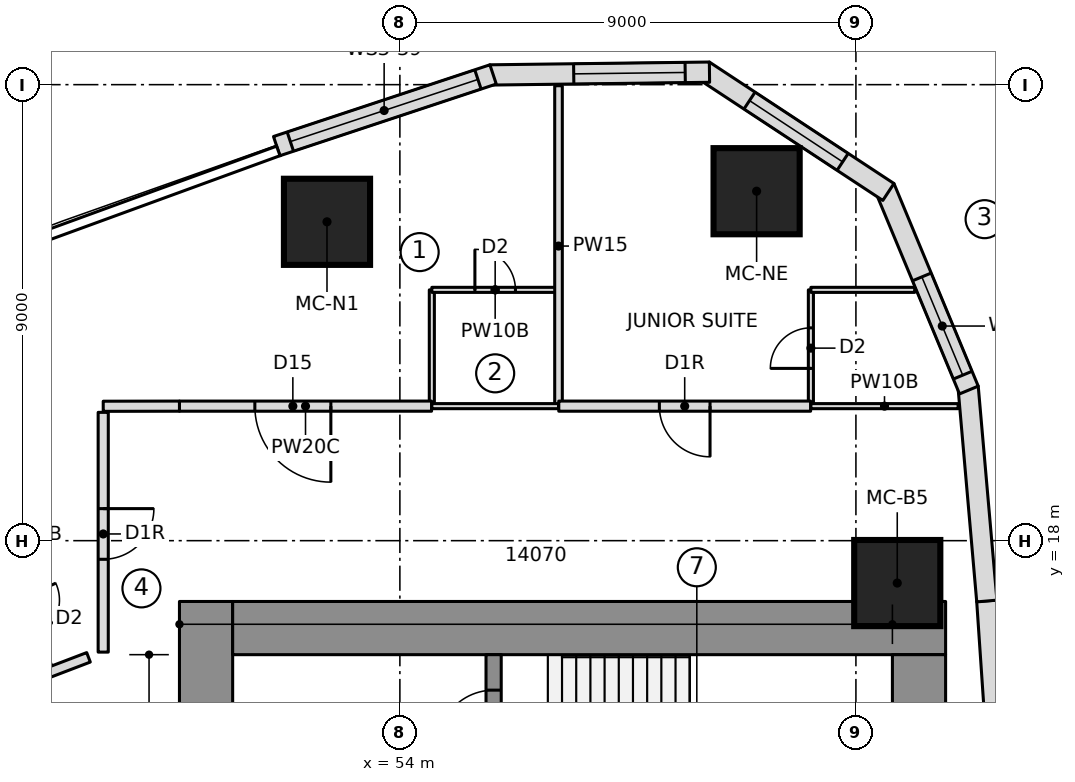
"""IFC4 building model, lengths in metres.
Left out: names, types, materials, properties, quantities, classifications, styles, units other than length and angle.
Written with IfcOpenShell. Run it as: python <this file> out.ifc"""

import sys

from ifc_helpers import new_model, si_unit, direction, frame, frame_2d, origin, origin_2d, place, context, subcontext, project, spatial, polyline, rectangle, outline, extrude, element, fill, save


model = new_model("IFC4")
c1 = context("Model", 3, precision=1e-05, world=origin(), true_north=direction((0.0, 1.0)))
c2 = subcontext(c1, "Body", "Model", "MODEL_VIEW")
j1 = project(units=[si_unit("LENGTHUNIT", "METRE"), si_unit("PLANEANGLEUNIT", "RADIAN")], contexts=[c1])
p1 = place(None, origin())
s1 = spatial("IfcSite", under=j1, at=p1, CompositionType="ELEMENT")
p2 = place(p1, origin())
s2 = spatial("IfcBuilding", under=s1, at=p2, CompositionType="ELEMENT")
p3 = place(p2, frame((0.0, 0.0, 109.75)))
s3 = spatial("IfcBuildingStorey", under=s2, at=p3, CompositionType="ELEMENT", Elevation=109.75)
p4 = place(p3, frame((50.175, 6.65, 0.0), z_axis=(0.0, 0.0, 1.0), x_axis=(0.0, 1.0, 0.0)))
e1 = element("IfcWall", 1, at=p4, inside=s3, PredefinedType="SHEAR", context=c2, shape_type="SweptSolid", body=[
    extrude(rectangle(XDim=10.15, YDim=1.05, at=frame_2d((5.075, 0.0))), origin(), (0.0, 0.0, 1.0), 3.55),
])
p5 = place(p4, frame((6.5, 0.0, 0.0)))
e2 = element("IfcOpeningElement", 2, at=p5, cuts=e1, PredefinedType="OPENING", context=c2, shape_type="SweptSolid", body=[
    extrude(rectangle(XDim=1.1, YDim=2.1, at=frame_2d((0.55, 1.05))), frame((0.0, 0.535, 0.0), z_axis=(0.0, -1.0, 0.0), x_axis=(1.0, 0.0, 0.0)), (0.0, 0.0, 1.0), 1.07),
])
p6 = place(p3, frame((50.7, 16.275, 0.0), z_axis=(0.0, 0.0, 1.0), x_axis=(1.0, 0.0, 0.0)))
e3 = element("IfcWall", 3, at=p6, inside=s3, PredefinedType="SHEAR", context=c2, shape_type="SweptSolid", body=[
    extrude(rectangle(XDim=14.07, YDim=1.05, at=frame_2d((7.035, 0.0))), origin(), (0.0, 0.0, 1.0), 3.55),
])
p7 = place(p3, frame((64.245, 9.389, 0.0), z_axis=(0.0, 0.0, 1.0), x_axis=(0.0, 1.0, 0.0)))
e4 = element("IfcWall", 4, at=p7, inside=s3, PredefinedType="SHEAR", context=c2, shape_type="SweptSolid", body=[
    extrude(rectangle(XDim=6.361, YDim=1.05, at=frame_2d((3.181, 0.0))), origin(), (0.0, 0.0, 1.0), 3.55),
])
p8 = place(p3, frame((55.85, 10.35, 0.0), z_axis=(0.0, 0.0, 1.0), x_axis=(0.0, 1.0, 0.0)))
e5 = element("IfcWall", 5, at=p8, inside=s3, PredefinedType="SHEAR", context=c2, shape_type="SweptSolid", body=[
    extrude(rectangle(XDim=5.4, YDim=0.3, at=frame_2d((2.7, 0.0))), origin(), (0.0, 0.0, 1.0), 3.55),
])
p9 = place(p8, frame((1.43, 0.0, 0.0)))
e6 = element("IfcOpeningElement", 6, at=p9, cuts=e5, PredefinedType="OPENING", context=c2, shape_type="SweptSolid", body=[
    extrude(rectangle(XDim=1.1, YDim=2.1, at=frame_2d((0.55, 1.05))), frame((0.0, 0.16, 0.0), z_axis=(0.0, -1.0, 0.0), x_axis=(1.0, 0.0, 0.0)), (0.0, 0.0, 1.0), 0.32),
])
p10 = place(p8, frame((3.6, 0.0, 0.0)))
e7 = element("IfcOpeningElement", 7, at=p10, cuts=e5, PredefinedType="OPENING", context=c2, shape_type="SweptSolid", body=[
    extrude(rectangle(XDim=1.1, YDim=2.1, at=frame_2d((0.55, 1.05))), frame((0.0, 0.16, 0.0), z_axis=(0.0, -1.0, 0.0), x_axis=(1.0, 0.0, 0.0)), (0.0, 0.0, 1.0), 0.32),
])
for number, where, z_axis, x_axis in (
    (8, (63.816, 17.164, 0.0), (0.0, 0.0, 1.0), (1.0, 0.0, 0.0)),
    (9, (61.04, 24.897, 0.0), (0.0, 0.0, 1.0), (1.0, 0.0, 0.0)),
    (10, (52.562, 24.293, 0.0), (0.0, 0.0, 1.0), (1.0, 0.0, 0.0)),
):
    element("IfcColumn", number, at=place(p3, frame(where, z_axis=z_axis, x_axis=x_axis)), inside=s3, PredefinedType="COLUMN", context=c2, shape_type="SweptSolid", body=[
        extrude(rectangle(XDim=1.7, YDim=1.7, at=origin_2d()), origin(), (0.0, 0.0, 1.0), 3.55),
    ])
p11 = place(p3, frame((65.868, 12.614, 0.0), z_axis=(0.0, 0.0, 1.0), x_axis=(-0.067724559895, 0.997704056315, 0.0)))
e11 = element("IfcWall", 11, at=p11, inside=s3, PredefinedType="NOTDEFINED", context=c2, shape_type="SweptSolid", body=[
    extrude(outline(polyline([(-0.002, -0.2), (4.209, -0.2), (4.205, 0.2), (0.002, 0.2), (-0.002, -0.2)])), origin(), (0.0, 0.0, 1.0), 3.25),
])
p12 = place(p3, frame((65.583, 16.811, 0.0), z_axis=(0.0, 0.0, 1.0), x_axis=(-0.086992730434, 0.996208946382, 0.0)))
e12 = element("IfcWall", 12, at=p12, inside=s3, PredefinedType="NOTDEFINED", context=c2, shape_type="SweptSolid", body=[
    extrude(outline(polyline([(-0.002, -0.2), (4.238, -0.2), (4.176, 0.2), (0.002, 0.2), (-0.002, -0.2)])), origin(), (0.0, 0.0, 1.0), 3.25),
])
p13 = place(p3, frame((65.217, 21.002, 0.0), z_axis=(0.0, 0.0, 1.0), x_axis=(-0.383997751971, 0.923334027577, 0.0)))
e13 = element("IfcWall", 13, at=p13, inside=s3, PredefinedType="NOTDEFINED", context=c2, shape_type="SweptSolid", body=[
    extrude(outline(polyline([(-0.031, -0.2), (4.3, -0.2), (4.177, 0.2), (0.031, 0.2), (-0.031, -0.2)])), origin(), (0.0, 0.0, 1.0), 3.25),
])
p14 = place(p13, frame((0.287, 0.0, 0.6)))
e14 = element("IfcOpeningElement", 14, at=p14, cuts=e13, PredefinedType="OPENING", context=c2, shape_type="SweptSolid", body=[
    extrude(outline(polyline([(0.0, 1.4), (0.08, 1.802), (0.308, 2.142), (0.648, 2.37), (1.05, 2.45), (1.452, 2.37), (1.792, 2.142), (2.02, 1.802), (2.1, 1.4), (2.1, 1.05), (2.02, 0.648), (1.792, 0.308), (1.452, 0.08), (1.05, 0.0), (0.648, 0.08), (0.308, 0.308), (0.08, 0.648), (0.0, 1.05), (0.0, 1.4)])), frame((0.0, 0.21, 0.0), z_axis=(0.0, -1.0, 0.0), x_axis=(1.0, 0.0, 0.0)), (0.0, 0.0, 1.0), 0.42),
])
p15 = place(p3, frame((63.59, 24.916, 0.0), z_axis=(0.0, 0.0, 1.0), x_axis=(-0.835340523653, 0.549732852887, 0.0)))
e15 = element("IfcWall", 15, at=p15, inside=s3, PredefinedType="NOTDEFINED", context=c2, shape_type="SweptSolid", body=[
    extrude(outline(polyline([(-0.061, -0.2), (4.3, -0.2), (4.178, 0.2), (0.061, 0.2), (-0.061, -0.2)])), origin(), (0.0, 0.0, 1.0), 3.25),
])
p16 = place(p15, frame((1.02, 0.0, 0.6)))
e16 = element("IfcOpeningElement", 16, at=p16, cuts=e15, PredefinedType="OPENING", context=c2, shape_type="SweptSolid", body=[
    extrude(outline(polyline([(0.0, 1.35), (0.084, 1.771), (0.322, 2.128), (0.679, 2.366), (1.1, 2.45), (1.521, 2.366), (1.878, 2.128), (2.116, 1.771), (2.2, 1.35), (2.2, 1.1), (2.116, 0.679), (1.878, 0.322), (1.521, 0.084), (1.1, 0.0), (0.679, 0.084), (0.322, 0.322), (0.084, 0.679), (0.0, 1.1), (0.0, 1.35)])), frame((0.0, 0.21, 0.0), z_axis=(0.0, -1.0, 0.0), x_axis=(1.0, 0.0, 0.0)), (0.0, 0.0, 1.0), 0.42),
])
p17 = place(p3, frame((60.049, 27.246, 0.0), z_axis=(0.0, 0.0, 1.0), x_axis=(-0.999919718849, -0.012671063772, 0.0)))
e17 = element("IfcWall", 17, at=p17, inside=s3, PredefinedType="NOTDEFINED", context=c2, shape_type="SweptSolid", body=[
    extrude(outline(polyline([(-0.061, -0.2), (4.27, -0.2), (4.208, 0.2), (0.061, 0.2), (-0.061, -0.2)])), origin(), (0.0, 0.0, 1.0), 3.25),
])
p18 = place(p17, frame((0.418, 0.0, 0.6)))
e18 = element("IfcOpeningElement", 18, at=p18, cuts=e17, PredefinedType="OPENING", context=c2, shape_type="SweptSolid", body=[
    extrude(outline(polyline([(0.0, 1.35), (0.084, 1.771), (0.322, 2.128), (0.679, 2.366), (1.1, 2.45), (1.521, 2.366), (1.878, 2.128), (2.116, 1.771), (2.2, 1.35), (2.2, 1.1), (2.116, 0.679), (1.878, 0.322), (1.521, 0.084), (1.1, 0.0), (0.679, 0.084), (0.322, 0.322), (0.084, 0.679), (0.0, 1.1), (0.0, 1.35)])), frame((0.0, 0.21, 0.0), z_axis=(0.0, -1.0, 0.0), x_axis=(1.0, 0.0, 0.0)), (0.0, 0.0, 1.0), 0.42),
])
p19 = place(p3, frame((55.81, 27.192, 0.0), z_axis=(0.0, 0.0, 1.0), x_axis=(-0.94925004851, -0.314522408429, 0.0)))
e19 = element("IfcWall", 19, at=p19, inside=s3, PredefinedType="NOTDEFINED", context=c2, shape_type="SweptSolid", body=[
    extrude(outline(polyline([(-0.031, -0.2), (4.468, -0.2), (4.468, 0.2), (0.031, 0.2), (-0.031, -0.2)])), origin(), (0.0, 0.0, 1.0), 3.25),
])
p20 = place(p19, frame((0.284, 0.0, 0.9)))
e20 = element("IfcOpeningElement", 20, at=p20, cuts=e19, PredefinedType="OPENING", context=c2, shape_type="SweptSolid", body=[
    extrude(rectangle(XDim=3.9, YDim=1.8, at=frame_2d((1.95, 0.9))), frame((0.0, 0.21, 0.0), z_axis=(0.0, -1.0, 0.0), x_axis=(1.0, 0.0, 0.0)), (0.0, 0.0, 1.0), 0.42),
])
p21 = place(p3, frame((54.631, 20.65, 0.0), z_axis=(0.0, 0.0, 1.0), x_axis=(0.0, 1.0, 0.0)))
e21 = element("IfcWall", 21, at=p21, inside=s3, PredefinedType="PARTITIONING", context=c2, shape_type="SweptSolid", body=[
    extrude(rectangle(XDim=2.3, YDim=0.1, at=frame_2d((1.15, 0.0))), origin(), (0.0, 0.0, 1.0), 3.25),
])
p22 = place(p3, frame((54.631, 22.95, 0.0), z_axis=(0.0, 0.0, 1.0), x_axis=(1.0, 0.0, 0.0)))
e22 = element("IfcWall", 22, at=p22, inside=s3, PredefinedType="PARTITIONING", context=c2, shape_type="SweptSolid", body=[
    extrude(rectangle(XDim=2.5, YDim=0.1, at=frame_2d((1.25, 0.0))), origin(), (0.0, 0.0, 1.0), 3.25),
])
p23 = place(p22, frame((0.85, 0.0, 0.0)))
e23 = element("IfcOpeningElement", 23, at=p23, cuts=e22, PredefinedType="OPENING", context=c2, shape_type="SweptSolid", body=[
    extrude(rectangle(XDim=0.8, YDim=2.1, at=frame_2d((0.4, 1.05))), frame((0.0, 0.06, 0.0), z_axis=(0.0, -1.0, 0.0), x_axis=(1.0, 0.0, 0.0)), (0.0, 0.0, 1.0), 0.12),
])
p24 = place(p3, frame((62.111, 20.65, 0.0), z_axis=(0.0, 0.0, 1.0), x_axis=(0.0, 1.0, 0.0)))
e24 = element("IfcWall", 24, at=p24, inside=s3, PredefinedType="PARTITIONING", context=c2, shape_type="SweptSolid", body=[
    extrude(rectangle(XDim=2.3, YDim=0.1, at=frame_2d((1.15, 0.0))), origin(), (0.0, 0.0, 1.0), 3.25),
])
p25 = place(p24, frame((0.75, 0.0, 0.0)))
e25 = element("IfcOpeningElement", 25, at=p25, cuts=e24, PredefinedType="OPENING", context=c2, shape_type="SweptSolid", body=[
    extrude(rectangle(XDim=0.8, YDim=2.1, at=frame_2d((0.4, 1.05))), frame((0.0, 0.06, 0.0), z_axis=(0.0, -1.0, 0.0), x_axis=(1.0, 0.0, 0.0)), (0.0, 0.0, 1.0), 0.12),
])
p26 = place(p3, frame((62.111, 22.95, 0.0), z_axis=(0.0, 0.0, 1.0), x_axis=(1.0, 0.0, 0.0)))
e26 = element("IfcWall", 26, at=p26, inside=s3, PredefinedType="PARTITIONING", context=c2, shape_type="SweptSolid", body=[
    extrude(rectangle(XDim=2.049, YDim=0.1, at=frame_2d((1.025, 0.0))), origin(), (0.0, 0.0, 1.0), 3.25),
])
p27 = place(p3, frame((57.131, 20.65, 0.0), z_axis=(0.0, 0.0, 1.0), x_axis=(0.0, 1.0, 0.0)))
e27 = element("IfcWall", 27, at=p27, inside=s3, PredefinedType="PARTITIONING", context=c2, shape_type="SweptSolid", body=[
    extrude(rectangle(XDim=6.329, YDim=0.15, at=frame_2d((3.165, 0.0))), origin(), (0.0, 0.0, 1.0), 3.25),
])
p28 = place(p3, frame((46.169, 17.509, 0.0), z_axis=(0.0, 0.0, 1.0), x_axis=(0.417409478396, -0.90871850831, 0.0)))
e28 = element("IfcWall", 28, at=p28, inside=s3, PredefinedType="PARTITIONING", context=c2, shape_type="SweptSolid", body=[
    extrude(rectangle(XDim=2.283, YDim=0.1, at=frame_2d((1.142, 0.0))), origin(), (0.0, 0.0, 1.0), 3.25),
])
p29 = place(p28, frame((0.75, 0.0, 0.0)))
e29 = element("IfcOpeningElement", 29, at=p29, cuts=e28, PredefinedType="OPENING", context=c2, shape_type="SweptSolid", body=[
    extrude(rectangle(XDim=0.8, YDim=2.1, at=frame_2d((0.4, 1.05))), frame((0.0, 0.06, 0.0), z_axis=(0.0, -1.0, 0.0), x_axis=(1.0, 0.0, 0.0)), (0.0, 0.0, 1.0), 0.12),
])
p30 = place(p3, frame((54.625, 20.655, 0.0), z_axis=(0.0, 0.0, 1.0), x_axis=(-1.0, 0.0, 0.0)))
e30 = element("IfcWall", 30, at=p30, inside=s3, PredefinedType="PARTITIONING", context=c2, shape_type="SweptSolid", body=[
    extrude(rectangle(XDim=4.976, YDim=0.2, at=frame_2d((2.488, 0.0))), origin(), (0.0, 0.0, 1.0), 3.25),
])
p31 = place(p30, frame((1.988, 0.0, 0.0)))
e31 = element("IfcOpeningElement", 31, at=p31, cuts=e30, PredefinedType="OPENING", context=c2, shape_type="SweptSolid", body=[
    extrude(rectangle(XDim=1.5, YDim=2.1, at=frame_2d((0.75, 1.05))), frame((0.0, 0.11, 0.0), z_axis=(0.0, -1.0, 0.0), x_axis=(1.0, 0.0, 0.0)), (0.0, 0.0, 1.0), 0.22),
])
p32 = place(p3, frame((62.106, 20.655, 0.0), z_axis=(0.0, 0.0, 1.0), x_axis=(-1.0, 0.0, 0.0)))
e32 = element("IfcWall", 32, at=p32, inside=s3, PredefinedType="PARTITIONING", context=c2, shape_type="SweptSolid", body=[
    extrude(rectangle(XDim=4.971, YDim=0.2, at=frame_2d((2.485, 0.0))), origin(), (0.0, 0.0, 1.0), 3.25),
])
p33 = place(p32, frame((1.985, 0.0, 0.0)))
e33 = element("IfcOpeningElement", 33, at=p33, cuts=e32, PredefinedType="OPENING", context=c2, shape_type="SweptSolid", body=[
    extrude(rectangle(XDim=1.0, YDim=2.1, at=frame_2d((0.5, 1.05))), frame((0.0, 0.11, 0.0), z_axis=(0.0, -1.0, 0.0), x_axis=(1.0, 0.0, 0.0)), (0.0, 0.0, 1.0), 0.22),
])
p34 = place(p3, frame((57.131, 20.655, 0.0), z_axis=(0.0, 0.0, 1.0), x_axis=(-1.0, 0.0, 0.0)))
e34 = element("IfcWall", 34, at=p34, inside=s3, PredefinedType="PARTITIONING", context=c2, shape_type="SweptSolid", body=[
    extrude(rectangle(XDim=2.5, YDim=0.1, at=frame_2d((1.25, 0.0))), origin(), (0.0, 0.0, 1.0), 3.25),
])
p35 = place(p3, frame((65.017, 20.655, 0.0), z_axis=(0.0, 0.0, 1.0), x_axis=(-1.0, 0.0, 0.0)))
e35 = element("IfcWall", 35, at=p35, inside=s3, PredefinedType="PARTITIONING", context=c2, shape_type="SweptSolid", body=[
    extrude(rectangle(XDim=2.906, YDim=0.1, at=frame_2d((1.453, 0.0))), origin(), (0.0, 0.0, 1.0), 3.25),
])
p36 = place(p3, frame((47.855, 15.698, 0.0), z_axis=(0.0, 0.0, 1.0), x_axis=(-0.934199537442, -0.35675092746, 0.0)))
e36 = element("IfcWall", 36, at=p36, inside=s3, PredefinedType="PARTITIONING", context=c2, shape_type="SweptSolid", body=[
    extrude(rectangle(XDim=2.982, YDim=0.2, at=frame_2d((1.491, 0.0))), origin(), (0.0, 0.0, 1.0), 3.25),
])
p37 = place(p3, frame((49.65, 20.655, 0.0), z_axis=(0.0, 0.0, 1.0), x_axis=(-0.999998406651, -0.001785131852, 0.0)))
e37 = element("IfcWall", 37, at=p37, inside=s3, PredefinedType="PARTITIONING", context=c2, shape_type="SweptSolid", body=[
    extrude(rectangle(XDim=1.504, YDim=0.2, at=frame_2d((0.752, 0.0))), origin(), (0.0, 0.0, 1.0), 3.25),
])
p38 = place(p3, frame((48.146, 20.532, 0.0), z_axis=(0.0, 0.0, 1.0), x_axis=(-5.1594263e-05, -0.999999998669, 0.0)))
e38 = element("IfcWall", 38, at=p38, inside=s3, PredefinedType="PARTITIONING", context=c2, shape_type="SweptSolid", body=[
    extrude(rectangle(XDim=4.732, YDim=0.2, at=frame_2d((2.366, 0.0))), origin(), (0.0, 0.0, 1.0), 3.25),
])
p39 = place(p38, frame((1.9, 0.0, 0.0)))
e39 = element("IfcOpeningElement", 39, at=p39, cuts=e38, PredefinedType="OPENING", context=c2, shape_type="SweptSolid", body=[
    extrude(rectangle(XDim=1.0, YDim=2.1, at=frame_2d((0.5, 1.05))), frame((0.0, 0.11, 0.0), z_axis=(0.0, -1.0, 0.0), x_axis=(1.0, 0.0, 0.0)), (0.0, 0.0, 1.0), 0.22),
])
p40 = place(p14, origin())
e40 = element("IfcWindow", 40, at=p40, inside=s3, PartitioningType="SINGLE_PANEL", PredefinedType="WINDOW", context=c2, shape_type="SweptSolid", body=[
    extrude(outline(polyline([(0.0, 1.4), (0.08, 1.802), (0.308, 2.142), (0.648, 2.37), (1.05, 2.45), (1.452, 2.37), (1.792, 2.142), (2.02, 1.802), (2.1, 1.4), (2.1, 1.05), (2.02, 0.648), (1.792, 0.308), (1.452, 0.08), (1.05, 0.0), (0.648, 0.08), (0.308, 0.308), (0.08, 0.648), (0.0, 1.05), (0.0, 1.4)])), frame((0.0, 0.17, 0.0), z_axis=(0.0, -1.0, 0.0), x_axis=(1.0, 0.0, 0.0)), (0.0, 0.0, 1.0), 0.06),
])
fill(e14, e40)
p41 = place(p16, origin())
e41 = element("IfcWindow", 41, at=p41, inside=s3, PartitioningType="SINGLE_PANEL", PredefinedType="WINDOW", context=c2, shape_type="SweptSolid", body=[
    extrude(outline(polyline([(0.0, 1.35), (0.084, 1.771), (0.322, 2.128), (0.679, 2.366), (1.1, 2.45), (1.521, 2.366), (1.878, 2.128), (2.116, 1.771), (2.2, 1.35), (2.2, 1.1), (2.116, 0.679), (1.878, 0.322), (1.521, 0.084), (1.1, 0.0), (0.679, 0.084), (0.322, 0.322), (0.084, 0.679), (0.0, 1.1), (0.0, 1.35)])), frame((0.0, 0.17, 0.0), z_axis=(0.0, -1.0, 0.0), x_axis=(1.0, 0.0, 0.0)), (0.0, 0.0, 1.0), 0.06),
])
fill(e16, e41)
p42 = place(p18, origin())
e42 = element("IfcWindow", 42, at=p42, inside=s3, PartitioningType="SINGLE_PANEL", PredefinedType="WINDOW", context=c2, shape_type="SweptSolid", body=[
    extrude(outline(polyline([(0.0, 1.35), (0.084, 1.771), (0.322, 2.128), (0.679, 2.366), (1.1, 2.45), (1.521, 2.366), (1.878, 2.128), (2.116, 1.771), (2.2, 1.35), (2.2, 1.1), (2.116, 0.679), (1.878, 0.322), (1.521, 0.084), (1.1, 0.0), (0.679, 0.084), (0.322, 0.322), (0.084, 0.679), (0.0, 1.1), (0.0, 1.35)])), frame((0.0, 0.17, 0.0), z_axis=(0.0, -1.0, 0.0), x_axis=(1.0, 0.0, 0.0)), (0.0, 0.0, 1.0), 0.06),
])
fill(e18, e42)
p43 = place(p20, origin())
e43 = element("IfcWindow", 43, at=p43, inside=s3, PartitioningType="SINGLE_PANEL", PredefinedType="WINDOW", context=c2, shape_type="SweptSolid", body=[
    extrude(rectangle(XDim=3.9, YDim=1.8, at=frame_2d((1.95, 0.9))), frame((0.0, 0.17, 0.0), z_axis=(0.0, -1.0, 0.0), x_axis=(1.0, 0.0, 0.0)), (0.0, 0.0, 1.0), 0.06),
])
fill(e20, e43)
p44 = place(p23, origin())
e44 = element("IfcDoor", 44, at=p44, inside=s3, OperationType="SINGLE_SWING_LEFT", PredefinedType="DOOR", context=c2, shape_type="SweptSolid", body=[
    extrude(rectangle(XDim=0.8, YDim=2.1, at=frame_2d((0.4, 1.05))), frame((0.0, 0.025, 0.0), z_axis=(0.0, -1.0, 0.0), x_axis=(1.0, 0.0, 0.0)), (0.0, 0.0, 1.0), 0.05),
])
fill(e23, e44)
p45 = place(p25, origin())
e45 = element("IfcDoor", 45, at=p45, inside=s3, OperationType="SINGLE_SWING_LEFT", PredefinedType="DOOR", context=c2, shape_type="SweptSolid", body=[
    extrude(rectangle(XDim=0.8, YDim=2.1, at=frame_2d((0.4, 1.05))), frame((0.0, 0.025, 0.0), z_axis=(0.0, -1.0, 0.0), x_axis=(1.0, 0.0, 0.0)), (0.0, 0.0, 1.0), 0.05),
])
fill(e25, e45)
p46 = place(p31, origin())
e46 = element("IfcDoor", 46, at=p46, inside=s3, OperationType="DOUBLE_DOOR_SINGLE_SWING", PredefinedType="DOOR", context=c2, shape_type="SweptSolid", body=[
    extrude(rectangle(XDim=1.5, YDim=2.1, at=frame_2d((0.75, 1.05))), frame((0.0, 0.025, 0.0), z_axis=(0.0, -1.0, 0.0), x_axis=(1.0, 0.0, 0.0)), (0.0, 0.0, 1.0), 0.05),
])
fill(e31, e46)
p47 = place(p33, origin())
e47 = element("IfcDoor", 47, at=p47, inside=s3, OperationType="SINGLE_SWING_RIGHT", PredefinedType="DOOR", context=c2, shape_type="SweptSolid", body=[
    extrude(rectangle(XDim=1.0, YDim=2.1, at=frame_2d((0.5, 1.05))), frame((0.0, 0.025, 0.0), z_axis=(0.0, -1.0, 0.0), x_axis=(1.0, 0.0, 0.0)), (0.0, 0.0, 1.0), 0.05),
])
fill(e33, e47)
p48 = place(p39, origin())
e48 = element("IfcDoor", 48, at=p48, inside=s3, OperationType="SINGLE_SWING_RIGHT", PredefinedType="DOOR", context=c2, shape_type="SweptSolid", body=[
    extrude(rectangle(XDim=1.0, YDim=2.1, at=frame_2d((0.5, 1.05))), frame((0.0, 0.025, 0.0), z_axis=(0.0, -1.0, 0.0), x_axis=(1.0, 0.0, 0.0)), (0.0, 0.0, 1.0), 0.05),
])
fill(e39, e48)
p49 = place(p10, origin())
e49 = element("IfcDoor", 49, at=p49, inside=s3, OperationType="SINGLE_SWING_RIGHT", PredefinedType="DOOR", context=c2, shape_type="SweptSolid", body=[
    extrude(rectangle(XDim=1.1, YDim=2.1, at=frame_2d((0.55, 1.05))), frame((0.0, 0.025, 0.0), z_axis=(0.0, -1.0, 0.0), x_axis=(1.0, 0.0, 0.0)), (0.0, 0.0, 1.0), 0.05),
])
fill(e7, e49)
save(model, sys.argv[1])
